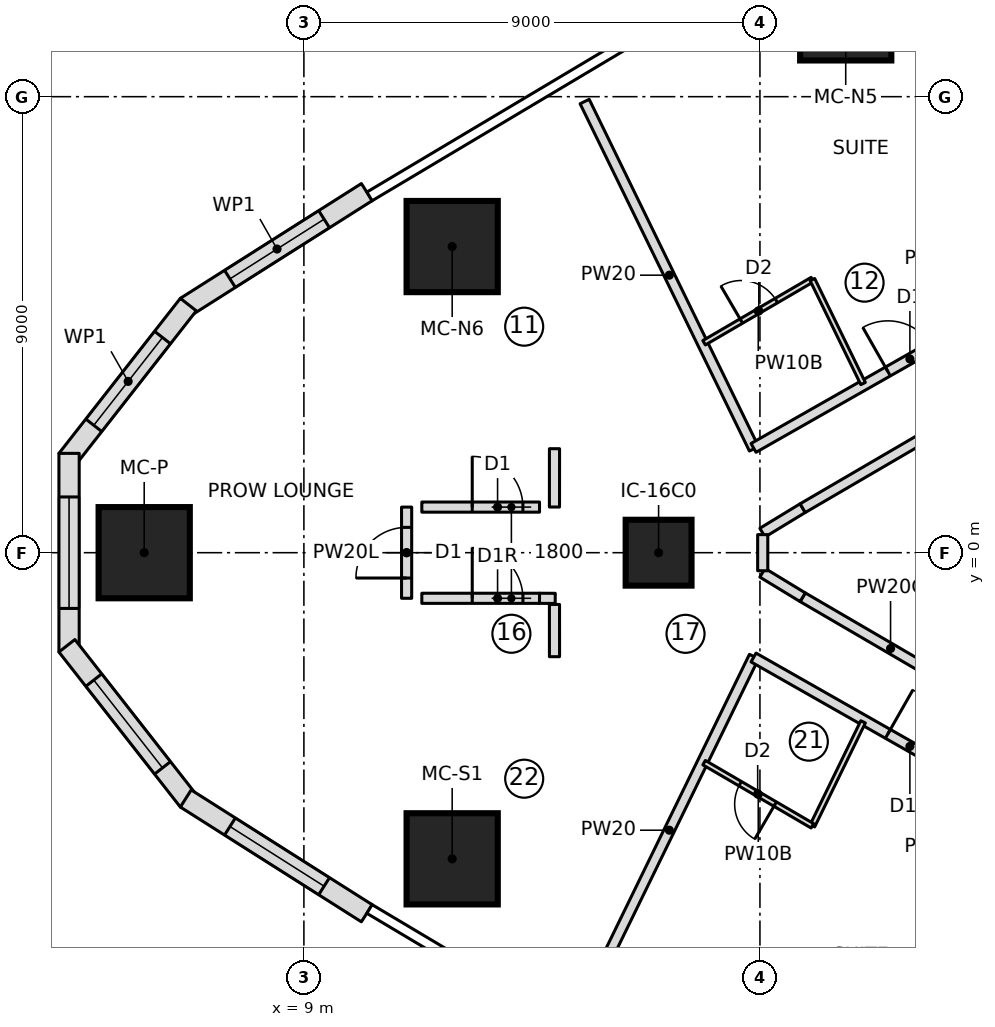
"""IFC4 building model, lengths in metres.
Left out: names, types, materials, properties, quantities, classifications, styles, units other than length and angle.
Written with IfcOpenShell. Run it as: python <this file> out.ifc"""

import sys

from ifc_helpers import new_model, si_unit, direction, frame, frame_2d, origin, origin_2d, place, context, subcontext, project, spatial, polyline, rectangle, outline, extrude, element, fill, save


model = new_model("IFC4")
c1 = context("Model", 3, precision=1e-05, world=origin(), true_north=direction((0.0, 1.0)))
c2 = subcontext(c1, "Body", "Model", "MODEL_VIEW")
j1 = project(units=[si_unit("LENGTHUNIT", "METRE"), si_unit("PLANEANGLEUNIT", "RADIAN")], contexts=[c1])
p1 = place(None, origin())
s1 = spatial("IfcSite", under=j1, at=p1, CompositionType="ELEMENT")
p2 = place(p1, origin())
s2 = spatial("IfcBuilding", under=s1, at=p2, CompositionType="ELEMENT")
p3 = place(p2, frame((0.0, 0.0, 53.8)))
s3 = spatial("IfcBuildingStorey", under=s2, at=p3, CompositionType="ELEMENT", Elevation=53.8)
for number, where, z_axis, x_axis in (
    (1, (5.848, 0.0, 0.0), (0.0, 0.0, 1.0), (1.0, 0.0, 0.0)),
    (2, (11.927, -6.042, 0.0), (0.0, 0.0, 1.0), (1.0, 0.0, 0.0)),
    (3, (19.693, 10.615, 0.0), (0.0, 0.0, 1.0), (1.0, 0.0, 0.0)),
    (4, (11.927, 6.042, 0.0), (0.0, 0.0, 1.0), (1.0, 0.0, 0.0)),
):
    element("IfcColumn", number, at=place(p3, frame(where, z_axis=z_axis, x_axis=x_axis)), inside=s3, PredefinedType="COLUMN", context=c2, shape_type="SweptSolid", body=[
        extrude(rectangle(XDim=1.8, YDim=1.8, at=origin_2d()), origin(), (0.0, 0.0, 1.0), 3.55),
    ])
p4 = place(p3, frame((16.0, 0.0, 0.0), z_axis=(0.0, 0.0, 1.0), x_axis=(1.0, 0.0, 0.0)))
e5 = element("IfcColumn", 5, at=p4, inside=s3, PredefinedType="COLUMN", context=c2, shape_type="SweptSolid", body=[
    extrude(rectangle(XDim=1.3, YDim=1.3, at=origin_2d()), origin(), (0.0, 0.0, 1.0), 3.55),
])
p5 = place(p3, frame((10.242, 7.116, 0.0), z_axis=(0.0, 0.0, 1.0), x_axis=(-0.844551578623, -0.535474211372, 0.0)))
e6 = element("IfcWall", 6, at=p5, inside=s3, PredefinedType="NOTDEFINED", context=c2, shape_type="SweptSolid", body=[
    extrude(outline(polyline([(0.0, -0.2), (4.23, -0.2), (4.162, 0.2), (0.0, 0.2), (0.0, -0.2)])), origin(), (0.0, 0.0, 1.0), 3.25),
])
p6 = place(p5, frame((0.998, 0.0, 0.6)))
e7 = element("IfcOpeningElement", 7, at=p6, cuts=e6, PredefinedType="OPENING", context=c2, shape_type="SweptSolid", body=[
    extrude(outline(polyline([(0.0, 1.35), (0.084, 1.771), (0.322, 2.128), (0.679, 2.366), (1.1, 2.45), (1.521, 2.366), (1.878, 2.128), (2.116, 1.771), (2.2, 1.35), (2.2, 1.1), (2.116, 0.679), (1.878, 0.322), (1.521, 0.084), (1.1, 0.0), (0.679, 0.084), (0.322, 0.322), (0.084, 0.679), (0.0, 1.1), (0.0, 1.35)])), frame((0.0, 0.21, 0.0), z_axis=(0.0, -1.0, 0.0), x_axis=(1.0, 0.0, 0.0)), (0.0, 0.0, 1.0), 0.42),
])
p7 = place(p3, frame((6.698, 4.87, 0.0), z_axis=(0.0, 0.0, 1.0), x_axis=(-0.616586647779, -0.787287054245, 0.0)))
e8 = element("IfcWall", 8, at=p7, inside=s3, PredefinedType="NOTDEFINED", context=c2, shape_type="SweptSolid", body=[
    extrude(outline(polyline([(-0.034, -0.2), (3.852, -0.2), (3.714, 0.2), (0.034, 0.2), (-0.034, -0.2)])), origin(), (0.0, 0.0, 1.0), 3.25),
])
p8 = place(p7, frame((0.792, 0.0, 0.6)))
e9 = element("IfcOpeningElement", 9, at=p8, cuts=e8, PredefinedType="OPENING", context=c2, shape_type="SweptSolid", body=[
    extrude(outline(polyline([(0.0, 1.35), (0.084, 1.771), (0.322, 2.128), (0.679, 2.366), (1.1, 2.45), (1.521, 2.366), (1.878, 2.128), (2.116, 1.771), (2.2, 1.35), (2.2, 1.1), (2.116, 0.679), (1.878, 0.322), (1.521, 0.084), (1.1, 0.0), (0.679, 0.084), (0.322, 0.322), (0.084, 0.679), (0.0, 1.1), (0.0, 1.35)])), frame((0.0, 0.21, 0.0), z_axis=(0.0, -1.0, 0.0), x_axis=(1.0, 0.0, 0.0)), (0.0, 0.0, 1.0), 0.42),
])
p9 = place(p3, frame((4.365, 1.891, 0.0), z_axis=(0.0, 0.0, 1.0), x_axis=(0.0, -1.0, 0.0)))
e10 = element("IfcWall", 10, at=p9, inside=s3, PredefinedType="NOTDEFINED", context=c2, shape_type="SweptSolid", body=[
    extrude(outline(polyline([(-0.069, -0.2), (3.852, -0.2), (3.714, 0.2), (0.069, 0.2), (-0.069, -0.2)])), origin(), (0.0, 0.0, 1.0), 3.25),
])
p10 = place(p9, frame((0.792, 0.0, 0.6)))
e11 = element("IfcOpeningElement", 11, at=p10, cuts=e10, PredefinedType="OPENING", context=c2, shape_type="SweptSolid", body=[
    extrude(outline(polyline([(0.0, 1.35), (0.084, 1.771), (0.322, 2.128), (0.679, 2.366), (1.1, 2.45), (1.521, 2.366), (1.878, 2.128), (2.116, 1.771), (2.2, 1.35), (2.2, 1.1), (2.116, 0.679), (1.878, 0.322), (1.521, 0.084), (1.1, 0.0), (0.679, 0.084), (0.322, 0.322), (0.084, 0.679), (0.0, 1.1), (0.0, 1.35)])), frame((0.0, 0.21, 0.0), z_axis=(0.0, -1.0, 0.0), x_axis=(1.0, 0.0, 0.0)), (0.0, 0.0, 1.0), 0.42),
])
p11 = place(p3, frame((4.365, -1.891, 0.0), z_axis=(0.0, 0.0, 1.0), x_axis=(0.616586647779, -0.787287054245, 0.0)))
e12 = element("IfcWall", 12, at=p11, inside=s3, PredefinedType="NOTDEFINED", context=c2, shape_type="SweptSolid", body=[
    extrude(outline(polyline([(-0.069, -0.2), (3.817, -0.2), (3.749, 0.2), (0.069, 0.2), (-0.069, -0.2)])), origin(), (0.0, 0.0, 1.0), 3.25),
])
p12 = place(p11, frame((0.792, 0.0, 0.6)))
e13 = element("IfcOpeningElement", 13, at=p12, cuts=e12, PredefinedType="OPENING", context=c2, shape_type="SweptSolid", body=[
    extrude(outline(polyline([(0.0, 1.35), (0.084, 1.771), (0.322, 2.128), (0.679, 2.366), (1.1, 2.45), (1.521, 2.366), (1.878, 2.128), (2.116, 1.771), (2.2, 1.35), (2.2, 1.1), (2.116, 0.679), (1.878, 0.322), (1.521, 0.084), (1.1, 0.0), (0.679, 0.084), (0.322, 0.322), (0.084, 0.679), (0.0, 1.1), (0.0, 1.35)])), frame((0.0, 0.21, 0.0), z_axis=(0.0, -1.0, 0.0), x_axis=(1.0, 0.0, 0.0)), (0.0, 0.0, 1.0), 0.42),
])
p13 = place(p3, frame((6.698, -4.87, 0.0), z_axis=(0.0, 0.0, 1.0), x_axis=(0.844551578623, -0.535474211372, 0.0)))
e14 = element("IfcWall", 14, at=p13, inside=s3, PredefinedType="NOTDEFINED", context=c2, shape_type="SweptSolid", body=[
    extrude(outline(polyline([(-0.034, -0.2), (4.196, -0.2), (4.196, 0.2), (0.034, 0.2), (-0.034, -0.2)])), origin(), (0.0, 0.0, 1.0), 3.25),
])
p14 = place(p13, frame((0.998, 0.0, 0.6)))
e15 = element("IfcOpeningElement", 15, at=p14, cuts=e14, PredefinedType="OPENING", context=c2, shape_type="SweptSolid", body=[
    extrude(outline(polyline([(0.0, 1.35), (0.084, 1.771), (0.322, 2.128), (0.679, 2.366), (1.1, 2.45), (1.521, 2.366), (1.878, 2.128), (2.116, 1.771), (2.2, 1.35), (2.2, 1.1), (2.116, 0.679), (1.878, 0.322), (1.521, 0.084), (1.1, 0.0), (0.679, 0.084), (0.322, 0.322), (0.084, 0.679), (0.0, 1.1), (0.0, 1.35)])), frame((0.0, 0.21, 0.0), z_axis=(0.0, -1.0, 0.0), x_axis=(1.0, 0.0, 0.0)), (0.0, 0.0, 1.0), 0.42),
])
p15 = place(p3, frame((11.027, -0.9, 0.0), z_axis=(0.0, 0.0, 1.0), x_axis=(0.0, 1.0, 0.0)))
e16 = element("IfcWall", 16, at=p15, inside=s3, PredefinedType="PARTITIONING", context=c2, shape_type="SweptSolid", body=[
    extrude(rectangle(XDim=1.8, YDim=0.2, at=frame_2d((0.9, 0.0))), origin(), (0.0, 0.0, 1.0), 3.25),
])
p16 = place(p15, frame((0.4, 0.0, 0.0)))
e17 = element("IfcOpeningElement", 17, at=p16, cuts=e16, PredefinedType="OPENING", context=c2, shape_type="SweptSolid", body=[
    extrude(rectangle(XDim=1.0, YDim=2.1, at=frame_2d((0.5, 1.05))), frame((0.0, 0.11, 0.0), z_axis=(0.0, -1.0, 0.0), x_axis=(1.0, 0.0, 0.0)), (0.0, 0.0, 1.0), 0.22),
])
p17 = place(p3, frame((17.882, 2.05, 0.0), z_axis=(0.0, 0.0, 1.0), x_axis=(-0.438213564788, 0.898870887078, 0.0)))
e18 = element("IfcWall", 18, at=p17, inside=s3, PredefinedType="PARTITIONING", context=c2, shape_type="SweptSolid", body=[
    extrude(rectangle(XDim=7.625, YDim=0.2, at=frame_2d((3.813, 0.0))), origin(), (0.0, 0.0, 1.0), 3.25),
])
p18 = place(p3, frame((17.874, 2.068, 0.0), z_axis=(0.0, 0.0, 1.0), x_axis=(0.869280098963, 0.494319845391, 0.0)))
e19 = element("IfcWall", 19, at=p18, inside=s3, PredefinedType="PARTITIONING", context=c2, shape_type="SweptSolid", body=[
    extrude(rectangle(XDim=8.417, YDim=0.2, at=frame_2d((4.208, 0.0))), origin(), (0.0, 0.0, 1.0), 3.25),
])
p19 = place(p18, frame((3.05, 0.0, 0.0)))
e20 = element("IfcOpeningElement", 20, at=p19, cuts=e19, PredefinedType="OPENING", context=c2, shape_type="SweptSolid", body=[
    extrude(rectangle(XDim=1.0, YDim=2.1, at=frame_2d((0.5, 1.05))), frame((0.0, 0.11, 0.0), z_axis=(0.0, -1.0, 0.0), x_axis=(1.0, 0.0, 0.0)), (0.0, 0.0, 1.0), 0.22),
])
p20 = place(p3, frame((16.898, 4.144, 0.0), z_axis=(0.0, 0.0, 1.0), x_axis=(0.863707305865, 0.503993739837, 0.0)))
e21 = element("IfcWall", 21, at=p20, inside=s3, PredefinedType="PARTITIONING", context=c2, shape_type="SweptSolid", body=[
    extrude(rectangle(XDim=2.474, YDim=0.1, at=frame_2d((1.237, 0.0))), origin(), (0.0, 0.0, 1.0), 3.25),
])
p21 = place(p20, frame((0.85, 0.0, 0.0)))
e22 = element("IfcOpeningElement", 22, at=p21, cuts=e21, PredefinedType="OPENING", context=c2, shape_type="SweptSolid", body=[
    extrude(rectangle(XDim=0.8, YDim=2.1, at=frame_2d((0.4, 1.05))), frame((0.0, 0.06, 0.0), z_axis=(0.0, -1.0, 0.0), x_axis=(1.0, 0.0, 0.0)), (0.0, 0.0, 1.0), 0.12),
])
p22 = place(p3, frame((19.035, 5.39, 0.0), z_axis=(0.0, 0.0, 1.0), x_axis=(0.438122322582, -0.898915363344, 0.0)))
e23 = element("IfcWall", 23, at=p22, inside=s3, PredefinedType="PARTITIONING", context=c2, shape_type="SweptSolid", body=[
    extrude(rectangle(XDim=2.283, YDim=0.1, at=frame_2d((1.142, 0.0))), origin(), (0.0, 0.0, 1.0), 3.25),
])
p23 = place(p3, frame((14.541, -8.904, 0.0), z_axis=(0.0, 0.0, 1.0), x_axis=(0.438213564788, 0.898870887078, 0.0)))
e24 = element("IfcWall", 24, at=p23, inside=s3, PredefinedType="PARTITIONING", context=c2, shape_type="SweptSolid", body=[
    extrude(rectangle(XDim=7.625, YDim=0.2, at=frame_2d((3.813, 0.0))), origin(), (0.0, 0.0, 1.0), 3.25),
])
p24 = place(p3, frame((17.874, -2.068, 0.0), z_axis=(0.0, 0.0, 1.0), x_axis=(0.869280098963, -0.494319845391, 0.0)))
e25 = element("IfcWall", 25, at=p24, inside=s3, PredefinedType="PARTITIONING", context=c2, shape_type="SweptSolid", body=[
    extrude(rectangle(XDim=8.417, YDim=0.2, at=frame_2d((4.208, 0.0))), origin(), (0.0, 0.0, 1.0), 3.25),
])
p25 = place(p24, frame((3.05, 0.0, 0.0)))
e26 = element("IfcOpeningElement", 26, at=p25, cuts=e25, PredefinedType="OPENING", context=c2, shape_type="SweptSolid", body=[
    extrude(rectangle(XDim=1.0, YDim=2.1, at=frame_2d((0.5, 1.05))), frame((0.0, 0.11, 0.0), z_axis=(0.0, -1.0, 0.0), x_axis=(1.0, 0.0, 0.0)), (0.0, 0.0, 1.0), 0.22),
])
p26 = place(p3, frame((20.035, -3.338, 0.0), z_axis=(0.0, 0.0, 1.0), x_axis=(-0.438122322582, -0.898915363344, 0.0)))
e27 = element("IfcWall", 27, at=p26, inside=s3, PredefinedType="PARTITIONING", context=c2, shape_type="SweptSolid", body=[
    extrude(rectangle(XDim=2.283, YDim=0.1, at=frame_2d((1.142, 0.0))), origin(), (0.0, 0.0, 1.0), 3.25),
])
p27 = place(p3, frame((19.035, -5.39, 0.0), z_axis=(0.0, 0.0, 1.0), x_axis=(-0.863707305865, 0.503993739837, 0.0)))
e28 = element("IfcWall", 28, at=p27, inside=s3, PredefinedType="PARTITIONING", context=c2, shape_type="SweptSolid", body=[
    extrude(rectangle(XDim=2.474, YDim=0.1, at=frame_2d((1.237, 0.0))), origin(), (0.0, 0.0, 1.0), 3.25),
])
p28 = place(p27, frame((0.85, 0.0, 0.0)))
e29 = element("IfcOpeningElement", 29, at=p28, cuts=e28, PredefinedType="OPENING", context=c2, shape_type="SweptSolid", body=[
    extrude(rectangle(XDim=0.8, YDim=2.1, at=frame_2d((0.4, 1.05))), frame((0.0, 0.06, 0.0), z_axis=(0.0, -1.0, 0.0), x_axis=(1.0, 0.0, 0.0)), (0.0, 0.0, 1.0), 0.12),
])
p29 = place(p3, frame((22.312, -2.903, 0.0), z_axis=(0.0, 0.0, 1.0), x_axis=(-0.863710538269, 0.503988200341, 0.0)))
e30 = element("IfcWall", 30, at=p29, inside=s3, PredefinedType="PARTITIONING", context=c2, shape_type="SweptSolid", body=[
    extrude(rectangle(XDim=4.016, YDim=0.2, at=frame_2d((2.008, 0.0))), origin(), (0.0, 0.0, 1.0), 3.25),
])
for number, where, z_axis, x_axis in (
    (31, (18.844, -0.879, 0.0), (0.0, 0.0, 1.0), (-0.854, 0.52, 0.0)),
    (32, (18.05, 0.396, 0.0), (0.0, 0.0, 1.0), (0.854, 0.52, 0.0)),
):
    element("IfcWall", number, at=place(p3, frame(where, z_axis=z_axis, x_axis=x_axis)), inside=s3, PredefinedType="PARTITIONING", context=c2, shape_type="SweptSolid", body=[
        extrude(rectangle(XDim=0.929, YDim=0.2, at=frame_2d((0.464, 0.0))), origin(), (0.0, 0.0, 1.0), 3.25),
    ])
p30 = place(p3, frame((18.844, 0.879, 0.0), z_axis=(0.0, 0.0, 1.0), x_axis=(0.863710538269, 0.503988200341, 0.0)))
e33 = element("IfcWall", 33, at=p30, inside=s3, PredefinedType="PARTITIONING", context=c2, shape_type="SweptSolid", body=[
    extrude(rectangle(XDim=4.016, YDim=0.2, at=frame_2d((2.008, 0.0))), origin(), (0.0, 0.0, 1.0), 3.25),
])
p31 = place(p3, frame((11.327, 0.9, 0.0), z_axis=(0.0, 0.0, 1.0), x_axis=(1.0, 0.0, 0.0)))
e34 = element("IfcWall", 34, at=p31, inside=s3, PredefinedType="PARTITIONING", context=c2, shape_type="SweptSolid", body=[
    extrude(rectangle(XDim=2.323, YDim=0.2, at=frame_2d((1.161, 0.0))), origin(), (0.0, 0.0, 1.0), 3.25),
])
p32 = place(p31, frame((0.995, 0.0, 0.0)))
e35 = element("IfcOpeningElement", 35, at=p32, cuts=e34, PredefinedType="OPENING", context=c2, shape_type="SweptSolid", body=[
    extrude(rectangle(XDim=1.0, YDim=2.1, at=frame_2d((0.5, 1.05))), frame((0.0, 0.11, 0.0), z_axis=(0.0, -1.0, 0.0), x_axis=(1.0, 0.0, 0.0)), (0.0, 0.0, 1.0), 0.22),
])
p33 = place(p3, frame((11.327, -0.9, 0.0), z_axis=(0.0, 0.0, 1.0), x_axis=(1.0, 0.0, 0.0)))
e36 = element("IfcWall", 36, at=p33, inside=s3, PredefinedType="PARTITIONING", context=c2, shape_type="SweptSolid", body=[
    extrude(rectangle(XDim=2.323, YDim=0.2, at=frame_2d((1.161, 0.0))), origin(), (0.0, 0.0, 1.0), 3.25),
])
p34 = place(p33, frame((0.995, 0.0, 0.0)))
e37 = element("IfcOpeningElement", 37, at=p34, cuts=e36, PredefinedType="OPENING", context=c2, shape_type="SweptSolid", body=[
    extrude(rectangle(XDim=1.0, YDim=2.1, at=frame_2d((0.5, 1.05))), frame((0.0, 0.11, 0.0), z_axis=(0.0, -1.0, 0.0), x_axis=(1.0, 0.0, 0.0)), (0.0, 0.0, 1.0), 0.22),
])
p35 = place(p3, frame((18.055, -0.357, 0.0), z_axis=(0.0, 0.0, 1.0), x_axis=(0.0, 1.0, 0.0)))
e38 = element("IfcWall", 38, at=p35, inside=s3, PredefinedType="PARTITIONING", context=c2, shape_type="SweptSolid", body=[
    extrude(rectangle(XDim=0.713, YDim=0.2, at=frame_2d((0.357, 0.0))), origin(), (0.0, 0.0, 1.0), 3.25),
])
p36 = place(p3, frame((13.946, 2.052, 0.0), z_axis=(0.0, 0.0, 1.0), x_axis=(-0.000424178117, -0.999999910036, 0.0)))
e39 = element("IfcWall", 39, at=p36, inside=s3, PredefinedType="PARTITIONING", context=c2, shape_type="SweptSolid", body=[
    extrude(rectangle(XDim=1.151, YDim=0.2, at=frame_2d((0.576, 0.0))), origin(), (0.0, 0.0, 1.0), 3.25),
])
p37 = place(p3, frame((13.65, -0.9, 0.0), z_axis=(0.0, 0.0, 1.0), x_axis=(0.999984810316, -0.005511727301, 0.0)))
e40 = element("IfcWall", 40, at=p37, inside=s3, PredefinedType="PARTITIONING", context=c2, shape_type="SweptSolid", body=[
    extrude(rectangle(XDim=0.31, YDim=0.2, at=frame_2d((0.155, 0.0))), origin(), (0.0, 0.0, 1.0), 3.25),
])
p38 = place(p3, frame((13.945, -1.021, 0.0), z_axis=(0.0, 0.0, 1.0), x_axis=(0.000473596916, -0.999999887853, 0.0)))
e41 = element("IfcWall", 41, at=p38, inside=s3, PredefinedType="PARTITIONING", context=c2, shape_type="SweptSolid", body=[
    extrude(rectangle(XDim=1.031, YDim=0.2, at=frame_2d((0.516, 0.0))), origin(), (0.0, 0.0, 1.0), 3.25),
])
p39 = place(p6, origin())
e42 = element("IfcWindow", 42, at=p39, inside=s3, PartitioningType="SINGLE_PANEL", PredefinedType="WINDOW", context=c2, shape_type="SweptSolid", body=[
    extrude(outline(polyline([(0.0, 1.35), (0.084, 1.771), (0.322, 2.128), (0.679, 2.366), (1.1, 2.45), (1.521, 2.366), (1.878, 2.128), (2.116, 1.771), (2.2, 1.35), (2.2, 1.1), (2.116, 0.679), (1.878, 0.322), (1.521, 0.084), (1.1, 0.0), (0.679, 0.084), (0.322, 0.322), (0.084, 0.679), (0.0, 1.1), (0.0, 1.35)])), frame((0.0, 0.17, 0.0), z_axis=(0.0, -1.0, 0.0), x_axis=(1.0, 0.0, 0.0)), (0.0, 0.0, 1.0), 0.06),
])
fill(e7, e42)
p40 = place(p8, origin())
e43 = element("IfcWindow", 43, at=p40, inside=s3, PartitioningType="SINGLE_PANEL", PredefinedType="WINDOW", context=c2, shape_type="SweptSolid", body=[
    extrude(outline(polyline([(0.0, 1.35), (0.084, 1.771), (0.322, 2.128), (0.679, 2.366), (1.1, 2.45), (1.521, 2.366), (1.878, 2.128), (2.116, 1.771), (2.2, 1.35), (2.2, 1.1), (2.116, 0.679), (1.878, 0.322), (1.521, 0.084), (1.1, 0.0), (0.679, 0.084), (0.322, 0.322), (0.084, 0.679), (0.0, 1.1), (0.0, 1.35)])), frame((0.0, 0.17, 0.0), z_axis=(0.0, -1.0, 0.0), x_axis=(1.0, 0.0, 0.0)), (0.0, 0.0, 1.0), 0.06),
])
fill(e9, e43)
p41 = place(p10, origin())
e44 = element("IfcWindow", 44, at=p41, inside=s3, PartitioningType="SINGLE_PANEL", PredefinedType="WINDOW", context=c2, shape_type="SweptSolid", body=[
    extrude(outline(polyline([(0.0, 1.35), (0.084, 1.771), (0.322, 2.128), (0.679, 2.366), (1.1, 2.45), (1.521, 2.366), (1.878, 2.128), (2.116, 1.771), (2.2, 1.35), (2.2, 1.1), (2.116, 0.679), (1.878, 0.322), (1.521, 0.084), (1.1, 0.0), (0.679, 0.084), (0.322, 0.322), (0.084, 0.679), (0.0, 1.1), (0.0, 1.35)])), frame((0.0, 0.17, 0.0), z_axis=(0.0, -1.0, 0.0), x_axis=(1.0, 0.0, 0.0)), (0.0, 0.0, 1.0), 0.06),
])
fill(e11, e44)
p42 = place(p12, origin())
e45 = element("IfcWindow", 45, at=p42, inside=s3, PartitioningType="SINGLE_PANEL", PredefinedType="WINDOW", context=c2, shape_type="SweptSolid", body=[
    extrude(outline(polyline([(0.0, 1.35), (0.084, 1.771), (0.322, 2.128), (0.679, 2.366), (1.1, 2.45), (1.521, 2.366), (1.878, 2.128), (2.116, 1.771), (2.2, 1.35), (2.2, 1.1), (2.116, 0.679), (1.878, 0.322), (1.521, 0.084), (1.1, 0.0), (0.679, 0.084), (0.322, 0.322), (0.084, 0.679), (0.0, 1.1), (0.0, 1.35)])), frame((0.0, 0.17, 0.0), z_axis=(0.0, -1.0, 0.0), x_axis=(1.0, 0.0, 0.0)), (0.0, 0.0, 1.0), 0.06),
])
fill(e13, e45)
p43 = place(p14, origin())
e46 = element("IfcWindow", 46, at=p43, inside=s3, PartitioningType="SINGLE_PANEL", PredefinedType="WINDOW", context=c2, shape_type="SweptSolid", body=[
    extrude(outline(polyline([(0.0, 1.35), (0.084, 1.771), (0.322, 2.128), (0.679, 2.366), (1.1, 2.45), (1.521, 2.366), (1.878, 2.128), (2.116, 1.771), (2.2, 1.35), (2.2, 1.1), (2.116, 0.679), (1.878, 0.322), (1.521, 0.084), (1.1, 0.0), (0.679, 0.084), (0.322, 0.322), (0.084, 0.679), (0.0, 1.1), (0.0, 1.35)])), frame((0.0, 0.17, 0.0), z_axis=(0.0, -1.0, 0.0), x_axis=(1.0, 0.0, 0.0)), (0.0, 0.0, 1.0), 0.06),
])
fill(e15, e46)
p44 = place(p32, origin())
e47 = element("IfcDoor", 47, at=p44, inside=s3, OperationType="SINGLE_SWING_LEFT", PredefinedType="DOOR", context=c2, shape_type="SweptSolid", body=[
    extrude(rectangle(XDim=1.0, YDim=2.1, at=frame_2d((0.5, 1.05))), frame((0.0, 0.025, 0.0), z_axis=(0.0, -1.0, 0.0), x_axis=(1.0, 0.0, 0.0)), (0.0, 0.0, 1.0), 0.05),
])
fill(e35, e47)
p45 = place(p34, origin())
e48 = element("IfcDoor", 48, at=p45, inside=s3, OperationType="SINGLE_SWING_RIGHT", PredefinedType="DOOR", context=c2, shape_type="SweptSolid", body=[
    extrude(rectangle(XDim=1.0, YDim=2.1, at=frame_2d((0.5, 1.05))), frame((0.0, 0.025, 0.0), z_axis=(0.0, -1.0, 0.0), x_axis=(1.0, 0.0, 0.0)), (0.0, 0.0, 1.0), 0.05),
])
fill(e37, e48)
p46 = place(p16, origin())
e49 = element("IfcDoor", 49, at=p46, inside=s3, OperationType="SINGLE_SWING_LEFT", PredefinedType="DOOR", context=c2, shape_type="SweptSolid", body=[
    extrude(rectangle(XDim=1.0, YDim=2.1, at=frame_2d((0.5, 1.05))), frame((0.0, 0.025, 0.0), z_axis=(0.0, -1.0, 0.0), x_axis=(1.0, 0.0, 0.0)), (0.0, 0.0, 1.0), 0.05),
])
fill(e17, e49)
p47 = place(p21, origin())
e50 = element("IfcDoor", 50, at=p47, inside=s3, OperationType="SINGLE_SWING_LEFT", PredefinedType="DOOR", context=c2, shape_type="SweptSolid", body=[
    extrude(rectangle(XDim=0.8, YDim=2.1, at=frame_2d((0.4, 1.05))), frame((0.0, 0.025, 0.0), z_axis=(0.0, -1.0, 0.0), x_axis=(1.0, 0.0, 0.0)), (0.0, 0.0, 1.0), 0.05),
])
fill(e22, e50)
p48 = place(p19, origin())
e51 = element("IfcDoor", 51, at=p48, inside=s3, OperationType="SINGLE_SWING_LEFT", PredefinedType="DOOR", context=c2, shape_type="SweptSolid", body=[
    extrude(rectangle(XDim=1.0, YDim=2.1, at=frame_2d((0.5, 1.05))), frame((0.0, 0.025, 0.0), z_axis=(0.0, -1.0, 0.0), x_axis=(1.0, 0.0, 0.0)), (0.0, 0.0, 1.0), 0.05),
])
fill(e20, e51)
p49 = place(p28, origin())
e52 = element("IfcDoor", 52, at=p49, inside=s3, OperationType="SINGLE_SWING_LEFT", PredefinedType="DOOR", context=c2, shape_type="SweptSolid", body=[
    extrude(rectangle(XDim=0.8, YDim=2.1, at=frame_2d((0.4, 1.05))), frame((0.0, 0.025, 0.0), z_axis=(0.0, -1.0, 0.0), x_axis=(1.0, 0.0, 0.0)), (0.0, 0.0, 1.0), 0.05),
])
fill(e29, e52)
p50 = place(p25, origin())
e53 = element("IfcDoor", 53, at=p50, inside=s3, OperationType="SINGLE_SWING_RIGHT", PredefinedType="DOOR", context=c2, shape_type="SweptSolid", body=[
    extrude(rectangle(XDim=1.0, YDim=2.1, at=frame_2d((0.5, 1.05))), frame((0.0, 0.025, 0.0), z_axis=(0.0, -1.0, 0.0), x_axis=(1.0, 0.0, 0.0)), (0.0, 0.0, 1.0), 0.05),
])
fill(e26, e53)
save(model, sys.argv[1])
